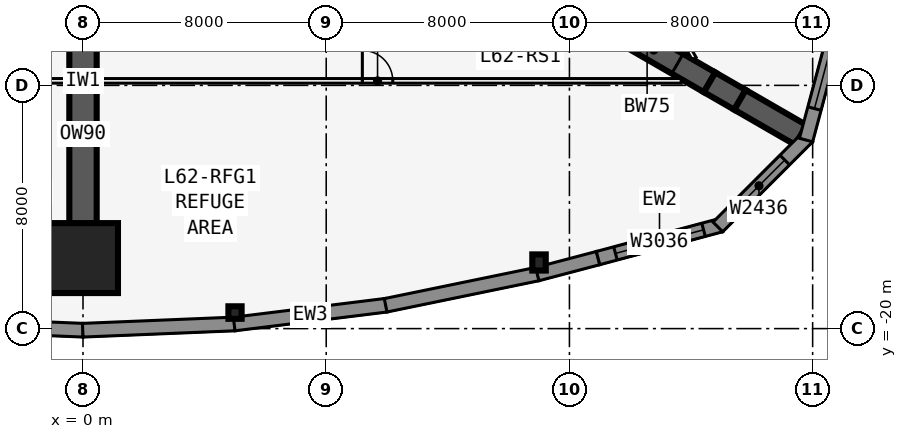
"""IFC4 building model, lengths in metres.
Left out: names, types, materials, properties, quantities, classifications, styles, units other than length and angle.
Written with IfcOpenShell. Run it as: python <this file> out.ifc"""

import sys

from ifc_helpers import new_model, si_unit, direction, frame, frame_2d, origin, origin_2d, place, context, subcontext, project, spatial, polyline, rectangle, i_section, outline, extrude, element, fill, save


model = new_model("IFC4")
c1 = context("Model", 3, precision=1e-05, world=origin(), true_north=direction((0.0, 1.0)))
c2 = subcontext(c1, "Body", "Model", "MODEL_VIEW")
j1 = project(units=[si_unit("LENGTHUNIT", "METRE"), si_unit("PLANEANGLEUNIT", "RADIAN")], contexts=[c1])
p1 = place(None, origin())
s1 = spatial("IfcSite", under=j1, at=p1, CompositionType="ELEMENT")
p2 = place(p1, origin())
s2 = spatial("IfcBuilding", under=s1, at=p2, CompositionType="ELEMENT")
p3 = place(p2, frame((0.0, 0.0, 233.3)))
s3 = spatial("IfcBuildingStorey", under=s2, at=p3, CompositionType="ELEMENT", Elevation=233.3)
p4 = place(p3, frame((16.5, -9.526, 0.0), z_axis=(0.0, 0.0, 1.0), x_axis=(0.866031398331, -0.499989616998, 0.0)))
e1 = element("IfcWall", 1, at=p4, inside=s3, PredefinedType="SHEAR", context=c2, shape_type="SweptSolid", body=[
    extrude(rectangle(XDim=4.746, YDim=0.75, at=frame_2d((2.373, 0.0))), origin(), (0.0, 0.0, 1.0), 6.0),
])
p5 = place(p4, frame((1.725, 0.0, 0.0)))
e2 = element("IfcOpeningElement", 2, at=p5, cuts=e1, PredefinedType="OPENING", context=c2, shape_type="SweptSolid", body=[
    extrude(rectangle(XDim=1.8, YDim=2.13, at=frame_2d((0.9, 1.065))), frame((0.0, 0.385, 0.0), z_axis=(0.0, -1.0, 0.0), x_axis=(1.0, 0.0, 0.0)), (0.0, 0.0, 1.0), 0.77),
])
p6 = place(p3, frame((20.61, -11.899, 0.0), z_axis=(0.0, 0.0, 1.0), x_axis=(0.866009537788, -0.500027479704, 0.0)))
e3 = element("IfcWall", 3, at=p6, inside=s3, PredefinedType="SHEAR", context=c2, shape_type="SweptSolid", body=[
    extrude(rectangle(XDim=1.155, YDim=0.75, at=frame_2d((0.577, 0.0))), origin(), (0.0, 0.0, 1.0), 6.0),
])
p7 = place(p3, frame((21.61, -12.477, 0.0), z_axis=(0.0, 0.0, 1.0), x_axis=(0.866055313784, -0.499948190782, 0.0)))
e4 = element("IfcWall", 4, at=p7, inside=s3, PredefinedType="SHEAR", context=c2, shape_type="SweptSolid", body=[
    extrude(rectangle(XDim=2.309, YDim=0.75, at=frame_2d((1.155, 0.0))), origin(), (0.0, 0.0, 1.0), 6.0),
])
p8 = place(p3, frame((0.0, -9.526, 0.0), z_axis=(0.0, 0.0, 1.0), x_axis=(0.0, -1.0, 0.0)))
e5 = element("IfcWall", 5, at=p8, inside=s3, PredefinedType="SHEAR", context=c2, shape_type="SweptSolid", body=[
    extrude(rectangle(XDim=8.154, YDim=0.9, at=frame_2d((4.077, 0.0))), origin(), (0.0, 0.0, 1.0), 6.0),
])
p9 = place(p3, frame((5.0, -19.472, 0.0), z_axis=(0.0, 0.0, 1.0), x_axis=(0.0, -1.0, 0.0)))
e6 = element("IfcColumn", 6, at=p9, inside=s3, PredefinedType="COLUMN", context=c2, shape_type="SweptSolid", body=[
    extrude(i_section(OverallWidth=0.411, OverallDepth=0.434, WebThickness=0.036, FlangeThickness=0.057, at=origin_2d()), origin(), (0.0, 0.0, 1.0), 6.0),
])
p10 = place(p3, frame((15.0, -17.825, 0.0), z_axis=(0.0, 0.0, 1.0), x_axis=(1.0, 0.0, 0.0)))
e7 = element("IfcColumn", 7, at=p10, inside=s3, PredefinedType="COLUMN", context=c2, shape_type="SweptSolid", body=[
    extrude(i_section(OverallWidth=0.442, OverallDepth=0.531, WebThickness=0.066, FlangeThickness=0.106, at=origin_2d()), origin(), (0.0, 0.0, 1.0), 6.0),
])
p11 = place(p3, frame((0.0, -17.68, 0.0), z_axis=(0.0, 0.0, 1.0), x_axis=(0.0, -1.0, 0.0)))
e8 = element("IfcColumn", 8, at=p11, inside=s3, PredefinedType="COLUMN", context=c2, shape_type="SweptSolid", body=[
    extrude(rectangle(XDim=2.3, YDim=2.3, at=origin_2d()), origin(), (0.0, 0.0, 1.0), 6.0),
])
for number, where, z_axis, x_axis in (
    (9, (-4.991, -19.847, 0.0), (0.0, 0.0, 1.0), (0.999, -0.041, 0.0)),
    (10, (-0.009, -20.053, 0.0), (0.0, 0.0, 1.0), (0.999, 0.041, 0.0)),
):
    element("IfcWall", number, at=place(p3, frame(where, z_axis=z_axis, x_axis=x_axis)), inside=s3, PredefinedType="SOLIDWALL", context=c2, shape_type="SweptSolid", body=[
        extrude(outline(polyline([(0.0, 0.0), (5.004, 0.0), (5.004, 5.75), (0.0, 5.75), (0.0, 0.0)]), holes=[polyline([(4.402, 2.875), (4.337, 3.367), (4.148, 3.825), (3.846, 4.219), (3.452, 4.52), (2.994, 4.71), (2.502, 4.775), (2.01, 4.71), (1.552, 4.52), (1.159, 4.219), (0.857, 3.825), (0.667, 3.367), (0.602, 2.875), (0.667, 2.383), (0.857, 1.925), (1.159, 1.531), (1.552, 1.229), (2.01, 1.04), (2.502, 0.975), (2.994, 1.04), (3.452, 1.229), (3.846, 1.531), (4.148, 1.925), (4.337, 2.383), (4.402, 2.875)])]), frame((0.0, 0.225, 0.0), z_axis=(0.0, -1.0, 0.0), x_axis=(1.0, 0.0, 0.0)), (0.0, 0.0, 1.0), 0.45),
    ])
p12 = place(p3, frame((4.972, -19.849, 0.0), z_axis=(0.0, 0.0, 1.0), x_axis=(0.992455772574, 0.122603178936, 0.0)))
e11 = element("IfcWall", 11, at=p12, inside=s3, PredefinedType="SOLIDWALL", context=c2, shape_type="SweptSolid", body=[
    extrude(outline(polyline([(0.0, 0.0), (5.038, 0.0), (5.038, 5.75), (0.0, 5.75), (0.0, 0.0)]), holes=[polyline([(4.419, 2.875), (4.354, 3.367), (4.165, 3.825), (3.863, 4.219), (3.469, 4.52), (3.011, 4.71), (2.519, 4.775), (2.027, 4.71), (1.569, 4.52), (1.176, 4.219), (0.874, 3.825), (0.684, 3.367), (0.619, 2.875), (0.684, 2.383), (0.874, 1.925), (1.176, 1.531), (1.569, 1.229), (2.027, 1.04), (2.519, 0.975), (3.011, 1.04), (3.469, 1.229), (3.863, 1.531), (4.165, 1.925), (4.354, 2.383), (4.419, 2.875)])]), frame((0.0, 0.225, 0.0), z_axis=(0.0, -1.0, 0.0), x_axis=(1.0, 0.0, 0.0)), (0.0, 0.0, 1.0), 0.45),
])
p13 = place(p3, frame((9.955, -19.234, 0.0), z_axis=(0.0, 0.0, 1.0), x_axis=(0.979461488189, 0.201631329795, 0.0)))
e12 = element("IfcWall", 12, at=p13, inside=s3, PredefinedType="SOLIDWALL", context=c2, shape_type="SweptSolid", body=[
    extrude(outline(polyline([(0.0, 0.0), (5.105, 0.0), (5.105, 5.75), (0.0, 5.75), (0.0, 0.0)]), holes=[polyline([(4.502, 2.875), (4.436, 3.38), (4.241, 3.85), (3.931, 4.254), (3.527, 4.564), (3.057, 4.759), (2.552, 4.825), (2.048, 4.759), (1.577, 4.564), (1.174, 4.254), (0.864, 3.85), (0.669, 3.38), (0.602, 2.875), (0.669, 2.37), (0.864, 1.9), (1.174, 1.496), (1.577, 1.186), (2.048, 0.991), (2.552, 0.925), (3.057, 0.991), (3.527, 1.186), (3.931, 1.496), (4.241, 1.9), (4.436, 2.37), (4.502, 2.875)])]), frame((0.0, 0.225, 0.0), z_axis=(0.0, -1.0, 0.0), x_axis=(1.0, 0.0, 0.0)), (0.0, 0.0, 1.0), 0.45),
])
p14 = place(p3, frame((14.943, -18.207, 0.0), z_axis=(0.0, 0.0, 1.0), x_axis=(0.967010286052, 0.254737328772, 0.0)))
e13 = element("IfcWall", 13, at=p14, inside=s3, PredefinedType="SOLIDWALL", context=c2, shape_type="SweptSolid", body=[
    extrude(rectangle(XDim=2.068, YDim=0.45, at=frame_2d((1.034, 0.0))), origin(), (0.0, 0.0, 1.0), 5.75),
])
p15 = place(p3, frame((16.942, -17.681, 0.0), z_axis=(0.0, 0.0, 1.0), x_axis=(0.965920442324, 0.258839137498, 0.0)))
e14 = element("IfcWall", 14, at=p15, inside=s3, PredefinedType="SOLIDWALL", context=c2, shape_type="SweptSolid", body=[
    extrude(rectangle(XDim=4.184, YDim=0.45, at=frame_2d((2.092, 0.0))), origin(), (0.0, 0.0, 1.0), 5.75),
])
p16 = place(p15, frame((0.592, 0.0, 0.9)))
e15 = element("IfcOpeningElement", 15, at=p16, cuts=e14, PredefinedType="OPENING", context=c2, shape_type="SweptSolid", body=[
    extrude(rectangle(XDim=3.0, YDim=3.6, at=frame_2d((1.5, 1.8))), frame((0.0, 0.235, 0.0), z_axis=(0.0, -1.0, 0.0), x_axis=(1.0, 0.0, 0.0)), (0.0, 0.0, 1.0), 0.47),
])
p17 = place(p3, frame((20.882, -16.656, 0.0), z_axis=(0.0, 0.0, 1.0), x_axis=(0.707077605902, 0.707135955267, 0.0)))
e16 = element("IfcWall", 16, at=p17, inside=s3, PredefinedType="SOLIDWALL", context=c2, shape_type="SweptSolid", body=[
    extrude(outline(polyline([(4.184, 0.225), (4.125, 0.225), (3.705, 0.113), (3.675, 0.225), (0.0, 0.225), (0.0, -0.225), (4.184, -0.225), (4.184, 0.225)])), origin(), (0.0, 0.0, 1.0), 5.75),
])
p18 = place(p17, frame((0.713, 0.0, 0.9)))
e17 = element("IfcOpeningElement", 17, at=p18, cuts=e16, PredefinedType="OPENING", context=c2, shape_type="SweptSolid", body=[
    extrude(rectangle(XDim=2.4, YDim=3.6, at=frame_2d((1.2, 1.8))), frame((0.0, 0.235, 0.0), z_axis=(0.0, -1.0, 0.0), x_axis=(1.0, 0.0, 0.0)), (0.0, 0.0, 1.0), 0.47),
])
p19 = place(p3, frame((23.783, -13.798, 0.0), z_axis=(0.0, 0.0, 1.0), x_axis=(0.258799282522, 0.96593112144, 0.0)))
e18 = element("IfcWall", 18, at=p19, inside=s3, PredefinedType="SOLIDWALL", context=c2, shape_type="SweptSolid", body=[
    extrude(outline(polyline([(4.184, 0.225), (0.509, 0.225), (0.479, 0.113), (0.059, 0.225), (0.0, 0.225), (0.0, -0.225), (4.184, -0.225), (4.184, 0.225)])), origin(), (0.0, 0.0, 1.0), 5.75),
])
p20 = place(p19, frame((1.071, 0.0, 0.9)))
e19 = element("IfcOpeningElement", 19, at=p20, cuts=e18, PredefinedType="OPENING", context=c2, shape_type="SweptSolid", body=[
    extrude(rectangle(XDim=2.4, YDim=3.6, at=frame_2d((1.2, 1.8))), frame((0.0, 0.235, 0.0), z_axis=(0.0, -1.0, 0.0), x_axis=(1.0, 0.0, 0.0)), (0.0, 0.0, 1.0), 0.47),
])
p21 = place(p3, frame((-19.677, -11.851, 0.0), z_axis=(0.0, 0.0, 1.0), x_axis=(1.0, 0.0, 0.0)))
e20 = element("IfcWall", 20, at=p21, inside=s3, PredefinedType="PARTITIONING", context=c2, shape_type="SweptSolid", body=[
    extrude(rectangle(XDim=39.354, YDim=0.15, at=frame_2d((19.677, 0.0))), origin(), (0.0, 0.0, 1.0), 5.75),
])
p22 = place(p21, frame((6.489, 0.0, 0.0)))
e21 = element("IfcOpeningElement", 21, at=p22, cuts=e20, PredefinedType="OPENING", context=c2, shape_type="SweptSolid", body=[
    extrude(rectangle(XDim=1.0, YDim=2.13, at=frame_2d((0.5, 1.065))), frame((0.0, 0.085, 0.0), z_axis=(0.0, -1.0, 0.0), x_axis=(1.0, 0.0, 0.0)), (0.0, 0.0, 1.0), 0.17),
])
p23 = place(p21, frame((16.177, 0.0, 0.0)))
e22 = element("IfcOpeningElement", 22, at=p23, cuts=e20, PredefinedType="OPENING", context=c2, shape_type="SweptSolid", body=[
    extrude(rectangle(XDim=1.0, YDim=2.13, at=frame_2d((0.5, 1.065))), frame((0.0, 0.085, 0.0), z_axis=(0.0, -1.0, 0.0), x_axis=(1.0, 0.0, 0.0)), (0.0, 0.0, 1.0), 0.17),
])
p24 = place(p21, frame((28.865, 0.0, 0.0)))
e23 = element("IfcOpeningElement", 23, at=p24, cuts=e20, PredefinedType="OPENING", context=c2, shape_type="SweptSolid", body=[
    extrude(rectangle(XDim=1.0, YDim=2.13, at=frame_2d((0.5, 1.065))), frame((0.0, 0.085, 0.0), z_axis=(0.0, -1.0, 0.0), x_axis=(1.0, 0.0, 0.0)), (0.0, 0.0, 1.0), 0.17),
])
p25 = place(p3, frame((20.102, -11.115, 0.0), z_axis=(0.0, 0.0, 1.0), x_axis=(-0.500000265775, 0.866025250339, 0.0)))
e24 = element("IfcWall", 24, at=p25, inside=s3, PredefinedType="PARTITIONING", context=c2, shape_type="SweptSolid", body=[
    extrude(rectangle(XDim=39.354, YDim=0.15, at=frame_2d((19.677, 0.0))), origin(), (0.0, 0.0, 1.0), 5.75),
])
p26 = place(p25, frame((9.489, 0.0, 0.0)))
e25 = element("IfcOpeningElement", 25, at=p26, cuts=e24, PredefinedType="OPENING", context=c2, shape_type="SweptSolid", body=[
    extrude(rectangle(XDim=1.0, YDim=2.13, at=frame_2d((0.5, 1.065))), frame((0.0, 0.085, 0.0), z_axis=(0.0, -1.0, 0.0), x_axis=(1.0, 0.0, 0.0)), (0.0, 0.0, 1.0), 0.17),
])
p27 = place(p25, frame((21.177, 0.0, 0.0)))
e26 = element("IfcOpeningElement", 26, at=p27, cuts=e24, PredefinedType="OPENING", context=c2, shape_type="SweptSolid", body=[
    extrude(rectangle(XDim=1.0, YDim=2.13, at=frame_2d((0.5, 1.065))), frame((0.0, 0.085, 0.0), z_axis=(0.0, -1.0, 0.0), x_axis=(1.0, 0.0, 0.0)), (0.0, 0.0, 1.0), 0.17),
])
p28 = place(p25, frame((30.865, 0.0, 0.0)))
e27 = element("IfcOpeningElement", 27, at=p28, cuts=e24, PredefinedType="OPENING", context=c2, shape_type="SweptSolid", body=[
    extrude(rectangle(XDim=1.0, YDim=2.13, at=frame_2d((0.5, 1.065))), frame((0.0, 0.085, 0.0), z_axis=(0.0, -1.0, 0.0), x_axis=(1.0, 0.0, 0.0)), (0.0, 0.0, 1.0), 0.17),
])
p29 = place(p3, frame((-0.425, 22.966, 0.0), z_axis=(0.0, 0.0, 1.0), x_axis=(-0.500000265775, -0.866025250339, 0.0)))
e28 = element("IfcWall", 28, at=p29, inside=s3, PredefinedType="PARTITIONING", context=c2, shape_type="SweptSolid", body=[
    extrude(rectangle(XDim=39.354, YDim=0.15, at=frame_2d((19.677, 0.0))), origin(), (0.0, 0.0, 1.0), 5.75),
])
p30 = place(p29, frame((7.489, 0.0, 0.0)))
e29 = element("IfcOpeningElement", 29, at=p30, cuts=e28, PredefinedType="OPENING", context=c2, shape_type="SweptSolid", body=[
    extrude(rectangle(XDim=1.0, YDim=2.13, at=frame_2d((0.5, 1.065))), frame((0.0, 0.085, 0.0), z_axis=(0.0, -1.0, 0.0), x_axis=(1.0, 0.0, 0.0)), (0.0, 0.0, 1.0), 0.17),
])
p31 = place(p29, frame((17.177, 0.0, 0.0)))
e30 = element("IfcOpeningElement", 30, at=p31, cuts=e28, PredefinedType="OPENING", context=c2, shape_type="SweptSolid", body=[
    extrude(rectangle(XDim=1.0, YDim=2.13, at=frame_2d((0.5, 1.065))), frame((0.0, 0.085, 0.0), z_axis=(0.0, -1.0, 0.0), x_axis=(1.0, 0.0, 0.0)), (0.0, 0.0, 1.0), 0.17),
])
p32 = place(p29, frame((28.865, 0.0, 0.0)))
e31 = element("IfcOpeningElement", 31, at=p32, cuts=e28, PredefinedType="OPENING", context=c2, shape_type="SweptSolid", body=[
    extrude(rectangle(XDim=1.0, YDim=2.13, at=frame_2d((0.5, 1.065))), frame((0.0, 0.085, 0.0), z_axis=(0.0, -1.0, 0.0), x_axis=(1.0, 0.0, 0.0)), (0.0, 0.0, 1.0), 0.17),
])
p33 = place(p16, origin())
e32 = element("IfcWindow", 32, at=p33, inside=s3, PartitioningType="SINGLE_PANEL", PredefinedType="WINDOW", context=c2, shape_type="SweptSolid", body=[
    extrude(rectangle(XDim=3.0, YDim=3.6, at=frame_2d((1.5, 1.8))), frame((0.0, 0.03, 0.0), z_axis=(0.0, -1.0, 0.0), x_axis=(1.0, 0.0, 0.0)), (0.0, 0.0, 1.0), 0.06),
])
fill(e15, e32)
p34 = place(p18, origin())
e33 = element("IfcWindow", 33, at=p34, inside=s3, PartitioningType="SINGLE_PANEL", PredefinedType="WINDOW", context=c2, shape_type="SweptSolid", body=[
    extrude(rectangle(XDim=2.4, YDim=3.6, at=frame_2d((1.2, 1.8))), frame((0.0, 0.03, 0.0), z_axis=(0.0, -1.0, 0.0), x_axis=(1.0, 0.0, 0.0)), (0.0, 0.0, 1.0), 0.06),
])
fill(e17, e33)
p35 = place(p20, origin())
e34 = element("IfcWindow", 34, at=p35, inside=s3, PartitioningType="SINGLE_PANEL", PredefinedType="WINDOW", context=c2, shape_type="SweptSolid", body=[
    extrude(rectangle(XDim=2.4, YDim=3.6, at=frame_2d((1.2, 1.8))), frame((0.0, 0.03, 0.0), z_axis=(0.0, -1.0, 0.0), x_axis=(1.0, 0.0, 0.0)), (0.0, 0.0, 1.0), 0.06),
])
fill(e19, e34)
p36 = place(p24, origin())
e35 = element("IfcDoor", 35, at=p36, inside=s3, OperationType="SINGLE_SWING_LEFT", PredefinedType="DOOR", context=c2, shape_type="SweptSolid", body=[
    extrude(rectangle(XDim=1.0, YDim=2.13, at=frame_2d((0.5, 1.065))), frame((0.0, 0.025, 0.0), z_axis=(0.0, -1.0, 0.0), x_axis=(1.0, 0.0, 0.0)), (0.0, 0.0, 1.0), 0.05),
])
fill(e23, e35)
p37 = place(p5, origin())
e36 = element("IfcDoor", 36, at=p37, inside=s3, OperationType="DOUBLE_DOOR_DOUBLE_SWING", PredefinedType="DOOR", context=c2, shape_type="SweptSolid", body=[
    extrude(rectangle(XDim=1.8, YDim=2.13, at=frame_2d((0.9, 1.065))), frame((0.0, 0.025, 0.0), z_axis=(0.0, -1.0, 0.0), x_axis=(1.0, 0.0, 0.0)), (0.0, 0.0, 1.0), 0.05),
])
fill(e2, e36)
save(model, sys.argv[1])
